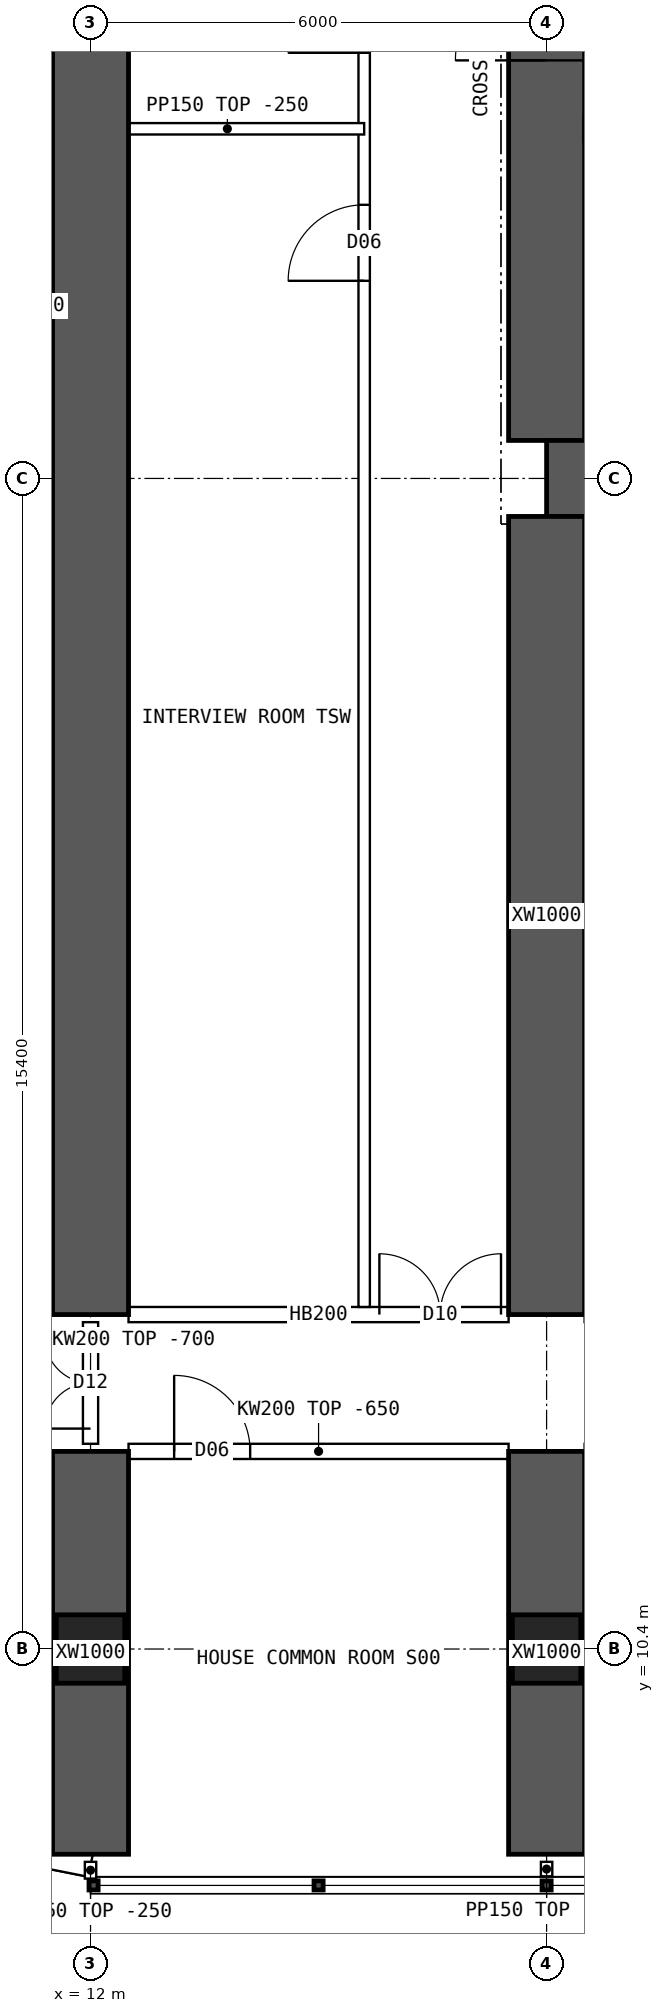
"""IFC4 building model, lengths in metres.
Left out: names, types, materials, properties, quantities, classifications, styles, units other than length and angle.
Written with IfcOpenShell. Run it as: python <this file> out.ifc"""

import sys

from ifc_helpers import new_model, si_unit, direction, frame, frame_2d, origin, origin_2d, place, context, subcontext, project, spatial, polyline, rectangle, hollow_rectangle, outline, extrude, element, fill, save


model = new_model("IFC4")
c1 = context("Model", 3, precision=1e-05, world=origin(), true_north=direction((0.0, 1.0)))
c2 = subcontext(c1, "Body", "Model", "MODEL_VIEW")
j1 = project(units=[si_unit("LENGTHUNIT", "METRE"), si_unit("PLANEANGLEUNIT", "RADIAN")], contexts=[c1])
p1 = place(None, origin())
s1 = spatial("IfcSite", under=j1, at=p1, CompositionType="ELEMENT")
p2 = place(p1, origin())
s2 = spatial("IfcBuilding", under=s1, at=p2, CompositionType="ELEMENT")
p3 = place(p2, frame((0.0, 0.0, 57.7)))
s3 = spatial("IfcBuildingStorey", under=s2, at=p3, CompositionType="ELEMENT", Elevation=57.7)
for number, where, z_axis, x_axis in (
    (1, (12.0, 10.4, 0.0), (0.0, 0.0, 1.0), (1.0, 0.0, 0.0)),
    (2, (18.0, 10.4, 0.0), (0.0, 0.0, 1.0), (1.0, 0.0, 0.0)),
):
    element("IfcColumn", number, at=place(p3, frame(where, z_axis=z_axis, x_axis=x_axis)), inside=s3, PredefinedType="COLUMN", context=c2, shape_type="SweptSolid", body=[
        extrude(hollow_rectangle(XDim=0.9, YDim=0.9, WallThickness=0.09, at=origin_2d()), origin(), (0.0, 0.0, 1.0), 3.75),
    ])
p4 = place(p3, frame((18.0, 25.8, 0.0), z_axis=(0.0, 0.0, 1.0), x_axis=(1.0, 0.0, 0.0)))
e3 = element("IfcWall", 3, at=p4, inside=s3, PredefinedType="SHEAR", context=c2, shape_type="SweptSolid", body=[
    extrude(rectangle(XDim=48.0, YDim=1.0, at=frame_2d((24.0, 0.0))), origin(), (0.0, 0.0, 1.0), 3.75),
])
p5 = place(p3, frame((18.0, 26.3, 0.0), z_axis=(0.0, 0.0, 1.0), x_axis=(0.0, 1.0, 0.0)))
e4 = element("IfcWall", 4, at=p5, inside=s3, PredefinedType="SHEAR", context=c2, shape_type="SweptSolid", body=[
    extrude(rectangle(XDim=11.4, YDim=1.0, at=frame_2d((5.7, 0.0))), origin(), (0.0, 0.0, 1.0), 3.75),
])
p6 = place(p5, frame((5.0, 0.0, 0.0)))
e5 = element("IfcOpeningElement", 5, at=p6, cuts=e4, PredefinedType="OPENING", context=c2, shape_type="SweptSolid", body=[
    extrude(rectangle(XDim=1.2, YDim=2.1, at=frame_2d((0.6, 1.05))), frame((0.0, 0.51, 0.0), z_axis=(0.0, -1.0, 0.0), x_axis=(1.0, 0.0, 0.0)), (0.0, 0.0, 1.0), 1.02),
])
p7 = place(p3, frame((12.0, 7.7, 0.0), z_axis=(0.0, 0.0, 1.0), x_axis=(0.0, 1.0, 0.0)))
e6 = element("IfcWall", 6, at=p7, inside=s3, PredefinedType="SHEAR", context=c2, shape_type="SweptSolid", body=[
    extrude(rectangle(XDim=5.3, YDim=1.0, at=frame_2d((2.65, 0.0))), origin(), (0.0, 0.0, 1.0), 3.75),
])
p8 = place(p3, frame((12.0, 14.8, 0.0), z_axis=(0.0, 0.0, 1.0), x_axis=(0.0, 1.0, 0.0)))
e7 = element("IfcWall", 7, at=p8, inside=s3, PredefinedType="SHEAR", context=c2, shape_type="SweptSolid", body=[
    extrude(rectangle(XDim=34.4, YDim=1.0, at=frame_2d((17.2, 0.0))), origin(), (0.0, 0.0, 1.0), 3.75),
])
p9 = place(p3, frame((18.0, 7.7, 0.0), z_axis=(0.0, 0.0, 1.0), x_axis=(0.0, 1.0, 0.0)))
e8 = element("IfcWall", 8, at=p9, inside=s3, PredefinedType="SHEAR", context=c2, shape_type="SweptSolid", body=[
    extrude(rectangle(XDim=5.3, YDim=1.0, at=frame_2d((2.65, 0.0))), origin(), (0.0, 0.0, 1.0), 3.75),
])
p10 = place(p3, frame((18.0, 14.8, 0.0), z_axis=(0.0, 0.0, 1.0), x_axis=(0.0, 1.0, 0.0)))
e9 = element("IfcWall", 9, at=p10, inside=s3, PredefinedType="SHEAR", context=c2, shape_type="SweptSolid", body=[
    extrude(rectangle(XDim=10.5, YDim=1.0, at=frame_2d((5.25, 0.0))), origin(), (0.0, 0.0, 1.0), 3.75),
])
p11 = place(p3, frame((8.843, 8.178, 0.0), z_axis=(0.0, 0.0, 1.0), x_axis=(0.980787251524, -0.195080412259, 0.0)))
e10 = element("IfcWall", 10, at=p11, inside=s3, PredefinedType="SOLIDWALL", context=c2, shape_type="SweptSolid", body=[
    extrude(outline(polyline([(-0.03, -0.15), (3.249, -0.15), (3.189, 0.15), (0.03, 0.15), (-0.03, -0.15)])), origin(), (0.0, 0.0, 1.0), 3.5),
])
p12 = place(p11, frame((0.909, 0.0, 0.9)))
e11 = element("IfcOpeningElement", 11, at=p12, cuts=e10, PredefinedType="OPENING", context=c2, shape_type="SweptSolid", body=[
    extrude(rectangle(XDim=1.4, YDim=1.8, at=frame_2d((0.7, 0.9))), frame((0.0, 0.16, 0.0), z_axis=(0.0, -1.0, 0.0), x_axis=(1.0, 0.0, 0.0)), (0.0, 0.0, 1.0), 0.32),
])
p13 = place(p3, frame((12.5, 13.0, 0.0), z_axis=(0.0, 0.0, 1.0), x_axis=(1.0, 0.0, 0.0)))
e12 = element("IfcWall", 12, at=p13, inside=s3, PredefinedType="SOLIDWALL", context=c2, shape_type="SweptSolid", body=[
    extrude(outline(polyline([(0.0, 0.0), (5.0, 0.0), (5.0, 3.1), (0.0, 3.1), (0.0, 0.0)])), frame((0.0, 0.1, 0.0), z_axis=(0.0, -1.0, 0.0), x_axis=(1.0, 0.0, 0.0)), (0.0, 0.0, 1.0), 0.2),
])
p14 = place(p13, frame((0.6, 0.0, 0.0)))
e13 = element("IfcOpeningElement", 13, at=p14, cuts=e12, PredefinedType="OPENING", context=c2, shape_type="SweptSolid", body=[
    extrude(rectangle(XDim=1.0, YDim=2.1, at=frame_2d((0.5, 1.05))), frame((0.0, 0.11, 0.0), z_axis=(0.0, -1.0, 0.0), x_axis=(1.0, 0.0, 0.0)), (0.0, 0.0, 1.0), 0.22),
])
p15 = place(p3, frame((12.5, 14.8, 0.0), z_axis=(0.0, 0.0, 1.0), x_axis=(1.0, 0.0, 0.0)))
e14 = element("IfcWall", 14, at=p15, inside=s3, PredefinedType="SOLIDWALL", context=c2, shape_type="SweptSolid", body=[
    extrude(rectangle(XDim=5.0, YDim=0.2, at=frame_2d((2.5, 0.0))), origin(), (0.0, 0.0, 1.0), 3.5),
])
p16 = place(p15, frame((3.3, 0.0, 0.0)))
e15 = element("IfcOpeningElement", 15, at=p16, cuts=e14, PredefinedType="OPENING", context=c2, shape_type="SweptSolid", body=[
    extrude(rectangle(XDim=1.6, YDim=2.1, at=frame_2d((0.8, 1.05))), frame((0.0, 0.11, 0.0), z_axis=(0.0, -1.0, 0.0), x_axis=(1.0, 0.0, 0.0)), (0.0, 0.0, 1.0), 0.22),
])
p17 = place(p3, frame((15.6, 14.9, 0.0), z_axis=(0.0, 0.0, 1.0), x_axis=(0.0, 1.0, 0.0)))
e16 = element("IfcWall", 16, at=p17, inside=s3, PredefinedType="PARTITIONING", context=c2, shape_type="SweptSolid", body=[
    extrude(rectangle(XDim=34.2, YDim=0.15, at=frame_2d((17.1, 0.0))), origin(), (0.0, 0.0, 1.0), 3.5),
])
p18 = place(p17, frame((13.5, 0.0, 0.0)))
e17 = element("IfcOpeningElement", 17, at=p18, cuts=e16, PredefinedType="OPENING", context=c2, shape_type="SweptSolid", body=[
    extrude(rectangle(XDim=1.0, YDim=2.1, at=frame_2d((0.5, 1.05))), frame((0.0, 0.085, 0.0), z_axis=(0.0, -1.0, 0.0), x_axis=(1.0, 0.0, 0.0)), (0.0, 0.0, 1.0), 0.17),
])
p19 = place(p17, frame((16.5, 0.0, 0.0)))
e18 = element("IfcOpeningElement", 18, at=p19, cuts=e16, PredefinedType="OPENING", context=c2, shape_type="SweptSolid", body=[
    extrude(rectangle(XDim=1.0, YDim=2.1, at=frame_2d((0.5, 1.05))), frame((0.0, 0.085, 0.0), z_axis=(0.0, -1.0, 0.0), x_axis=(1.0, 0.0, 0.0)), (0.0, 0.0, 1.0), 0.17),
])
p20 = place(p3, frame((12.0, 30.4, 0.0), z_axis=(0.0, 0.0, 1.0), x_axis=(1.0, 0.0, 0.0)))
e19 = element("IfcWall", 19, at=p20, inside=s3, PredefinedType="PARTITIONING", context=c2, shape_type="SweptSolid", body=[
    extrude(rectangle(XDim=3.6, YDim=0.15, at=frame_2d((1.8, 0.0))), origin(), (0.0, 0.0, 1.0), 3.5),
])
p21 = place(p3, frame((3.905, 30.85, 0.0), z_axis=(0.0, 0.0, 1.0), x_axis=(1.0, 0.0, 0.0)))
e20 = element("IfcWall", 20, at=p21, inside=s3, PredefinedType="PARTITIONING", context=c2, shape_type="SweptSolid", body=[
    extrude(outline(polyline([(0.0, 0.0), (8.02, 0.0), (8.02, 3.5), (2.397, 3.5), (2.395, 3.05), (1.797, 3.05), (1.795, 3.5), (0.0, 3.5), (0.0, 0.0)])), frame((0.0, 0.075, 0.0), z_axis=(0.0, -1.0, 0.0), x_axis=(1.0, 0.0, 0.0)), (0.0, 0.0, 1.0), 0.15),
])
p22 = place(p3, frame((12.0, 13.1, 0.0), z_axis=(0.0, 0.0, 1.0), x_axis=(0.0, 1.0, 0.0)))
e21 = element("IfcWall", 21, at=p22, inside=s3, PredefinedType="SOLIDWALL", context=c2, shape_type="SweptSolid", body=[
    extrude(outline(polyline([(0.0, 0.0), (1.6, 0.0), (1.6, 3.05), (0.0, 3.05), (0.0, 0.0)])), frame((0.0, 0.1, 0.0), z_axis=(0.0, -1.0, 0.0), x_axis=(1.0, 0.0, 0.0)), (0.0, 0.0, 1.0), 0.2),
])
p23 = place(p22, frame((0.2, 0.0, 0.0)))
e22 = element("IfcOpeningElement", 22, at=p23, cuts=e21, PredefinedType="OPENING", context=c2, shape_type="SweptSolid", body=[
    extrude(rectangle(XDim=1.2, YDim=2.1, at=frame_2d((0.6, 1.05))), frame((0.0, 0.11, 0.0), z_axis=(0.0, -1.0, 0.0), x_axis=(1.0, 0.0, 0.0)), (0.0, 0.0, 1.0), 0.22),
])
p24 = place(p3, frame((12.0, 7.6, 0.0), z_axis=(0.0, 0.0, 1.0), x_axis=(0.0, -1.0, 0.0)))
e23 = element("IfcWall", 23, at=p24, inside=s3, PredefinedType="PARTITIONING", context=c2, shape_type="SweptSolid", body=[
    extrude(rectangle(XDim=0.22, YDim=0.15, at=frame_2d((0.11, 0.0))), origin(), (0.0, 0.0, 1.0), 3.5),
])
p25 = place(p3, frame((18.0, 7.6, 0.0), z_axis=(0.0, 0.0, 1.0), x_axis=(0.0, -1.0, 0.0)))
e24 = element("IfcWall", 24, at=p25, inside=s3, PredefinedType="PARTITIONING", context=c2, shape_type="SweptSolid", body=[
    extrude(rectangle(XDim=0.19, YDim=0.15, at=frame_2d((0.095, 0.0))), origin(), (0.0, 0.0, 1.0), 3.5),
])
p26 = place(p6, origin())
e25 = element("IfcDoor", 25, at=p26, inside=s3, OperationType="SINGLE_SWING_LEFT", PredefinedType="DOOR", context=c2, shape_type="SweptSolid", body=[
    extrude(rectangle(XDim=1.2, YDim=2.1, at=frame_2d((0.6, 1.05))), frame((0.0, 0.025, 0.0), z_axis=(0.0, -1.0, 0.0), x_axis=(1.0, 0.0, 0.0)), (0.0, 0.0, 1.0), 0.05),
])
fill(e5, e25)
p27 = place(p16, origin())
e26 = element("IfcDoor", 26, at=p27, inside=s3, OperationType="DOUBLE_DOOR_SINGLE_SWING", PredefinedType="DOOR", context=c2, shape_type="SweptSolid", body=[
    extrude(rectangle(XDim=1.6, YDim=2.1, at=frame_2d((0.8, 1.05))), frame((0.0, 0.025, 0.0), z_axis=(0.0, -1.0, 0.0), x_axis=(1.0, 0.0, 0.0)), (0.0, 0.0, 1.0), 0.05),
])
fill(e15, e26)
p28 = place(p14, origin())
e27 = element("IfcDoor", 27, at=p28, inside=s3, OperationType="SINGLE_SWING_LEFT", PredefinedType="DOOR", context=c2, shape_type="SweptSolid", body=[
    extrude(rectangle(XDim=1.0, YDim=2.1, at=frame_2d((0.5, 1.05))), frame((0.0, 0.025, 0.0), z_axis=(0.0, -1.0, 0.0), x_axis=(1.0, 0.0, 0.0)), (0.0, 0.0, 1.0), 0.05),
])
fill(e13, e27)
p29 = place(p18, origin())
e28 = element("IfcDoor", 28, at=p29, inside=s3, OperationType="SINGLE_SWING_LEFT", PredefinedType="DOOR", context=c2, shape_type="SweptSolid", body=[
    extrude(rectangle(XDim=1.0, YDim=2.1, at=frame_2d((0.5, 1.05))), frame((0.0, 0.025, 0.0), z_axis=(0.0, -1.0, 0.0), x_axis=(1.0, 0.0, 0.0)), (0.0, 0.0, 1.0), 0.05),
])
fill(e17, e28)
p30 = place(p23, origin())
e29 = element("IfcDoor", 29, at=p30, inside=s3, OperationType="DOUBLE_DOOR_SINGLE_SWING", PredefinedType="DOOR", context=c2, shape_type="SweptSolid", body=[
    extrude(rectangle(XDim=1.2, YDim=2.1, at=frame_2d((0.6, 1.05))), frame((0.0, 0.025, 0.0), z_axis=(0.0, -1.0, 0.0), x_axis=(1.0, 0.0, 0.0)), (0.0, 0.0, 1.0), 0.05),
])
fill(e22, e29)
save(model, sys.argv[1])
